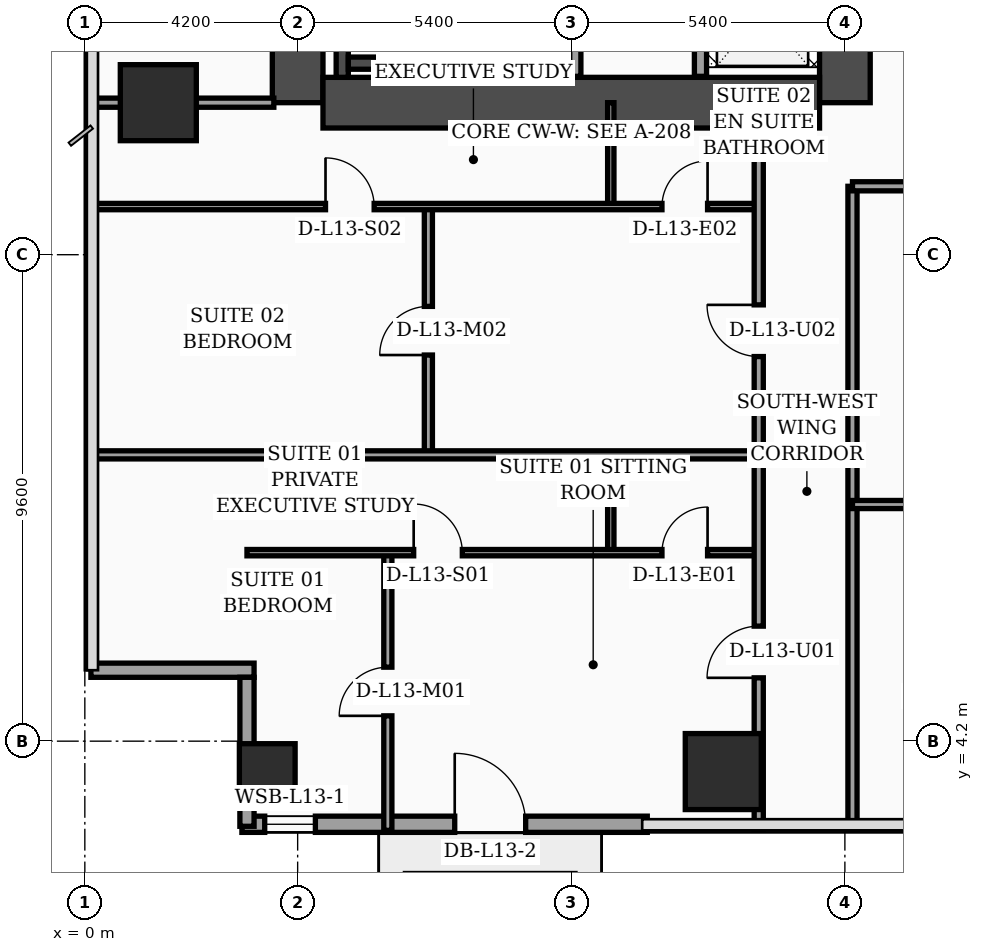
"""IFC4 building model, lengths in metres.
Left out: names, types, materials, properties, quantities, classifications, styles, units other than length and angle.
Written with IfcOpenShell. Run it as: python <this file> out.ifc"""

import sys

from ifc_helpers import new_model, si_unit, direction, frame, frame_2d, origin, origin_2d, place, context, subcontext, project, spatial, rectangle, hollow_rectangle, extrude, element, fill, save


model = new_model("IFC4")
c1 = context("Model", 3, precision=1e-05, world=origin(), true_north=direction((0.0, 1.0)))
c2 = subcontext(c1, "Body", "Model", "MODEL_VIEW")
j1 = project(units=[si_unit("LENGTHUNIT", "METRE"), si_unit("PLANEANGLEUNIT", "RADIAN")], contexts=[c1])
p1 = place(None, origin())
s1 = spatial("IfcSite", under=j1, at=p1, CompositionType="ELEMENT")
p2 = place(p1, origin())
s2 = spatial("IfcBuilding", under=s1, at=p2, CompositionType="ELEMENT")
p3 = place(p2, frame((0.0, 0.0, 58.4)))
s3 = spatial("IfcBuildingStorey", under=s2, at=p3, CompositionType="ELEMENT", Elevation=58.4)
p4 = place(p3, frame((4.2, 16.8, 0.0), z_axis=(0.0, 0.0, 1.0), x_axis=(0.0, 1.0, 0.0)))
e1 = element("IfcWall", 1, at=p4, inside=s3, PredefinedType="SHEAR", context=c2, shape_type="SweptSolid", body=[
    extrude(rectangle(XDim=21.6, YDim=1.0, at=frame_2d((10.8, 0.0))), origin(), (0.0, 0.0, 1.0), 3.56),
])
p5 = place(p3, frame((15.0, 16.8, 0.0), z_axis=(0.0, 0.0, 1.0), x_axis=(0.0, 1.0, 0.0)))
e2 = element("IfcWall", 2, at=p5, inside=s3, PredefinedType="SHEAR", context=c2, shape_type="SweptSolid", body=[
    extrude(rectangle(XDim=21.6, YDim=1.0, at=frame_2d((10.8, 0.0))), origin(), (0.0, 0.0, 1.0), 3.56),
])
p6 = place(p5, frame((8.65, 0.0, 0.0)))
e3 = element("IfcOpeningElement", 3, at=p6, cuts=e2, PredefinedType="OPENING", context=c2, shape_type="SweptSolid", body=[
    extrude(rectangle(XDim=1.1, YDim=2.2, at=frame_2d((0.55, 1.1))), frame((0.0, 0.51, 0.0), z_axis=(0.0, -1.0, 0.0), x_axis=(1.0, 0.0, 0.0)), (0.0, 0.0, 1.0), 1.02),
])
p7 = place(p5, frame((1.25, 0.0, 0.0)))
e4 = element("IfcOpeningElement", 4, at=p7, cuts=e2, PredefinedType="OPENING", context=c2, shape_type="SweptSolid", body=[
    extrude(rectangle(XDim=1.1, YDim=2.2, at=frame_2d((0.55, 1.1))), frame((0.0, 0.51, 0.0), z_axis=(0.0, -1.0, 0.0), x_axis=(1.0, 0.0, 0.0)), (0.0, 0.0, 1.0), 1.02),
])
p8 = place(p5, frame((3.8, 0.0, 0.0)))
e5 = element("IfcOpeningElement", 5, at=p8, cuts=e2, PredefinedType="OPENING", context=c2, shape_type="SweptSolid", body=[
    extrude(rectangle(XDim=1.1, YDim=2.2, at=frame_2d((0.55, 1.1))), frame((0.0, 0.51, 0.0), z_axis=(0.0, -1.0, 0.0), x_axis=(1.0, 0.0, 0.0)), (0.0, 0.0, 1.0), 1.02),
])
p9 = place(p5, frame((6.35, 0.0, 0.0)))
e6 = element("IfcOpeningElement", 6, at=p9, cuts=e2, PredefinedType="OPENING", context=c2, shape_type="SweptSolid", body=[
    extrude(rectangle(XDim=1.1, YDim=2.2, at=frame_2d((0.55, 1.1))), frame((0.0, 0.51, 0.0), z_axis=(0.0, -1.0, 0.0), x_axis=(1.0, 0.0, 0.0)), (0.0, 0.0, 1.0), 1.02),
])
p10 = place(p3, frame((4.7, 16.8, 0.0), z_axis=(0.0, 0.0, 1.0), x_axis=(1.0, 0.0, 0.0)))
e7 = element("IfcWall", 7, at=p10, inside=s3, PredefinedType="SHEAR", context=c2, shape_type="SweptSolid", body=[
    extrude(rectangle(XDim=9.8, YDim=1.0, at=frame_2d((4.9, 0.0))), origin(), (0.0, 0.0, 1.0), 3.56),
])
p11 = place(p3, frame((5.08, 17.3, 0.0), z_axis=(0.0, 0.0, 1.0), x_axis=(0.0, 1.0, 0.0)))
e8 = element("IfcWall", 8, at=p11, inside=s3, PredefinedType="SOLIDWALL", context=c2, shape_type="SweptSolid", body=[
    extrude(rectangle(XDim=9.49, YDim=0.24, at=frame_2d((4.745, 0.0))), origin(), (0.0, 0.0, 1.0), 3.56),
])
p12 = place(p3, frame((8.42, 17.3, 0.0), z_axis=(0.0, 0.0, 1.0), x_axis=(0.0, 1.0, 0.0)))
e9 = element("IfcWall", 9, at=p12, inside=s3, PredefinedType="SOLIDWALL", context=c2, shape_type="SweptSolid", body=[
    extrude(rectangle(XDim=9.49, YDim=0.24, at=frame_2d((4.745, 0.0))), origin(), (0.0, 0.0, 1.0), 3.56),
])
p13 = place(p12, frame((0.35, 0.0, 0.0)))
e10 = element("IfcOpeningElement", 10, at=p13, cuts=e9, PredefinedType="OPENING", context=c2, shape_type="SweptSolid", body=[
    extrude(rectangle(XDim=1.15, YDim=2.2, at=frame_2d((0.575, 1.1))), frame((0.0, 0.13, 0.0), z_axis=(0.0, -1.0, 0.0), x_axis=(1.0, 0.0, 0.0)), (0.0, 0.0, 1.0), 0.26),
])
p14 = place(p3, frame((5.2, 17.58, 0.0), z_axis=(0.0, 0.0, 1.0), x_axis=(1.0, 0.0, 0.0)))
e11 = element("IfcWall", 11, at=p14, inside=s3, PredefinedType="SOLIDWALL", context=c2, shape_type="SweptSolid", body=[
    extrude(rectangle(XDim=3.1, YDim=0.24, at=frame_2d((1.55, 0.0))), origin(), (0.0, 0.0, 1.0), 3.56),
])
p15 = place(p3, frame((3.6, 3.6, 0.0), z_axis=(0.0, 0.0, 1.0), x_axis=(1.0, 0.0, 0.0)))
e12 = element("IfcColumn", 12, at=p15, inside=s3, PredefinedType="COLUMN", context=c2, shape_type="SweptSolid", body=[
    extrude(hollow_rectangle(XDim=1.1, YDim=1.1, WallThickness=0.045, at=origin_2d()), origin(), (0.0, 0.0, 1.0), 3.56),
])
for number, where, z_axis, x_axis in (
    (13, (1.45, 16.8, 0.0), (0.0, 0.0, 1.0), (1.0, 0.0, 0.0)),
    (14, (12.6, 3.6, 0.0), (0.0, 0.0, 1.0), (1.0, 0.0, 0.0)),
):
    element("IfcColumn", number, at=place(p3, frame(where, z_axis=z_axis, x_axis=x_axis)), inside=s3, PredefinedType="COLUMN", context=c2, shape_type="SweptSolid", body=[
        extrude(rectangle(XDim=1.5, YDim=1.5, at=origin_2d()), origin(), (0.0, 0.0, 1.0), 3.56),
    ])
p16 = place(p3, frame((3.1, 2.56, 0.0), z_axis=(0.0, 0.0, 1.0), x_axis=(1.0, 0.0, 0.0)))
e15 = element("IfcWall", 15, at=p16, inside=s3, PredefinedType="SOLIDWALL", context=c2, shape_type="SweptSolid", body=[
    extrude(rectangle(XDim=8.0, YDim=0.32, at=frame_2d((4.0, 0.0))), origin(), (0.0, 0.0, 1.0), 3.56),
])
p17 = place(p16, frame((0.45, 0.0, 0.75)))
e16 = element("IfcOpeningElement", 16, at=p17, cuts=e15, PredefinedType="OPENING", context=c2, shape_type="SweptSolid", body=[
    extrude(rectangle(XDim=1.0, YDim=1.6, at=frame_2d((0.5, 0.8))), frame((0.0, 0.17, 0.0), z_axis=(0.0, -1.0, 0.0), x_axis=(1.0, 0.0, 0.0)), (0.0, 0.0, 1.0), 0.34),
])
p18 = place(p16, frame((4.2, 0.0, 0.0)))
e17 = element("IfcOpeningElement", 17, at=p18, cuts=e15, PredefinedType="OPENING", context=c2, shape_type="SweptSolid", body=[
    extrude(rectangle(XDim=1.4, YDim=2.25, at=frame_2d((0.7, 1.125))), frame((0.0, 0.17, 0.0), z_axis=(0.0, -1.0, 0.0), x_axis=(1.0, 0.0, 0.0)), (0.0, 0.0, 1.0), 0.34),
])
p19 = place(p3, frame((0.12, 5.6, 0.0), z_axis=(0.0, 0.0, 1.0), x_axis=(1.0, 0.0, 0.0)))
e18 = element("IfcWall", 18, at=p19, inside=s3, PredefinedType="SOLIDWALL", context=c2, shape_type="SweptSolid", body=[
    extrude(rectangle(XDim=3.22, YDim=0.28, at=frame_2d((1.61, 0.0))), origin(), (0.0, 0.0, 1.0), 2.84),
])
p20 = place(p3, frame((3.2, 5.46, 0.0), z_axis=(0.0, 0.0, 1.0), x_axis=(0.0, -1.0, 0.0)))
e19 = element("IfcWall", 19, at=p20, inside=s3, PredefinedType="SOLIDWALL", context=c2, shape_type="SweptSolid", body=[
    extrude(rectangle(XDim=2.94, YDim=0.28, at=frame_2d((1.47, 0.0))), origin(), (0.0, 0.0, 1.0), 2.84),
])
p21 = place(p3, frame((9.68, 17.32, 0.0), z_axis=(0.0, 0.0, 1.0), x_axis=(0.0, 1.0, 0.0)))
e20 = element("IfcWall", 20, at=p21, inside=s3, PredefinedType="SOLIDWALL", context=c2, shape_type="SweptSolid", body=[
    extrude(rectangle(XDim=7.68, YDim=0.22, at=frame_2d((3.84, 0.0))), origin(), (0.0, 0.0, 1.0), 3.56),
])
p22 = place(p3, frame((12.15, 17.32, 0.0), z_axis=(0.0, 0.0, 1.0), x_axis=(0.0, 1.0, 0.0)))
e21 = element("IfcWall", 21, at=p22, inside=s3, PredefinedType="SOLIDWALL", context=c2, shape_type="SweptSolid", body=[
    extrude(rectangle(XDim=7.65, YDim=0.24, at=frame_2d((3.825, 0.0))), origin(), (0.0, 0.0, 1.0), 3.56),
])
p23 = place(p3, frame((0.08, 16.8, 0.0), z_axis=(0.0, 0.0, 1.0), x_axis=(1.0, 0.0, 0.0)))
e22 = element("IfcWall", 22, at=p23, inside=s3, PredefinedType="PARTITIONING", context=c2, shape_type="SweptSolid", body=[
    extrude(rectangle(XDim=3.65, YDim=0.18, at=frame_2d((1.825, 0.0))), origin(), (0.0, 0.0, 1.0), 2.84),
])
p24 = place(p3, frame((10.38, 7.92, 0.0), z_axis=(0.0, 0.0, 1.0), x_axis=(0.0, 1.0, 0.0)))
e23 = element("IfcWall", 23, at=p24, inside=s3, PredefinedType="PARTITIONING", context=c2, shape_type="SweptSolid", body=[
    extrude(rectangle(XDim=1.93, YDim=0.125, at=frame_2d((0.965, 0.0))), origin(), (0.0, 0.0, 1.0), 3.09),
])
p25 = place(p3, frame((5.98, 2.44, 0.0), z_axis=(0.0, 0.0, 1.0), x_axis=(0.0, 1.0, 0.0)))
e24 = element("IfcWall", 24, at=p25, inside=s3, PredefinedType="PARTITIONING", context=c2, shape_type="SweptSolid", body=[
    extrude(rectangle(XDim=5.48, YDim=0.16, at=frame_2d((2.74, 0.0))), origin(), (0.0, 0.0, 1.0), 3.04),
])
p26 = place(p25, frame((2.26, 0.0, 0.0)))
e25 = element("IfcOpeningElement", 25, at=p26, cuts=e24, PredefinedType="OPENING", context=c2, shape_type="SweptSolid", body=[
    extrude(rectangle(XDim=0.96, YDim=2.2, at=frame_2d((0.48, 1.1))), frame((0.0, 0.09, 0.0), z_axis=(0.0, -1.0, 0.0), x_axis=(1.0, 0.0, 0.0)), (0.0, 0.0, 1.0), 0.18),
])
p27 = place(p3, frame((3.2, 7.92, 0.0), z_axis=(0.0, 0.0, 1.0), x_axis=(1.0, 0.0, 0.0)))
e26 = element("IfcWall", 26, at=p27, inside=s3, PredefinedType="PARTITIONING", context=c2, shape_type="SweptSolid", body=[
    extrude(rectangle(XDim=10.1, YDim=0.125, at=frame_2d((5.05, 0.0))), origin(), (0.0, 0.0, 1.0), 2.84),
])
p28 = place(p27, frame((3.29, 0.0, 0.0)))
e27 = element("IfcOpeningElement", 27, at=p28, cuts=e26, PredefinedType="OPENING", context=c2, shape_type="SweptSolid", body=[
    extrude(rectangle(XDim=0.96, YDim=2.2, at=frame_2d((0.48, 1.1))), frame((0.0, 0.073, 0.0), z_axis=(0.0, -1.0, 0.0), x_axis=(1.0, 0.0, 0.0)), (0.0, 0.0, 1.0), 0.145),
])
p29 = place(p27, frame((8.19, 0.0, 0.0)))
e28 = element("IfcOpeningElement", 28, at=p29, cuts=e26, PredefinedType="OPENING", context=c2, shape_type="SweptSolid", body=[
    extrude(rectangle(XDim=0.9, YDim=2.15, at=frame_2d((0.45, 1.075))), frame((0.0, 0.073, 0.0), z_axis=(0.0, -1.0, 0.0), x_axis=(1.0, 0.0, 0.0)), (0.0, 0.0, 1.0), 0.145),
])
p30 = place(p3, frame((10.38, 14.75, 0.0), z_axis=(0.0, 0.0, 1.0), x_axis=(0.0, 1.0, 0.0)))
e29 = element("IfcWall", 29, at=p30, inside=s3, PredefinedType="PARTITIONING", context=c2, shape_type="SweptSolid", body=[
    extrude(rectangle(XDim=2.05, YDim=0.125, at=frame_2d((1.025, 0.0))), origin(), (0.0, 0.0, 1.0), 3.56),
])
p31 = place(p3, frame((6.78, 9.85, 0.0), z_axis=(0.0, 0.0, 1.0), x_axis=(0.0, 1.0, 0.0)))
e30 = element("IfcWall", 30, at=p31, inside=s3, PredefinedType="PARTITIONING", context=c2, shape_type="SweptSolid", body=[
    extrude(rectangle(XDim=4.9, YDim=0.16, at=frame_2d((2.45, 0.0))), origin(), (0.0, 0.0, 1.0), 3.14),
])
p32 = place(p31, frame((1.97, 0.0, 0.0)))
e31 = element("IfcOpeningElement", 31, at=p32, cuts=e30, PredefinedType="OPENING", context=c2, shape_type="SweptSolid", body=[
    extrude(rectangle(XDim=0.96, YDim=2.2, at=frame_2d((0.48, 1.1))), frame((0.0, 0.09, 0.0), z_axis=(0.0, -1.0, 0.0), x_axis=(1.0, 0.0, 0.0)), (0.0, 0.0, 1.0), 0.18),
])
p33 = place(p3, frame((0.08, 14.75, 0.0), z_axis=(0.0, 0.0, 1.0), x_axis=(1.0, 0.0, 0.0)))
e32 = element("IfcWall", 32, at=p33, inside=s3, PredefinedType="PARTITIONING", context=c2, shape_type="SweptSolid", body=[
    extrude(rectangle(XDim=13.22, YDim=0.125, at=frame_2d((6.61, 0.0))), origin(), (0.0, 0.0, 1.0), 2.84),
])
p34 = place(p33, frame((4.67, 0.0, 0.0)))
e33 = element("IfcOpeningElement", 33, at=p34, cuts=e32, PredefinedType="OPENING", context=c2, shape_type="SweptSolid", body=[
    extrude(rectangle(XDim=0.96, YDim=2.2, at=frame_2d((0.48, 1.1))), frame((0.0, 0.073, 0.0), z_axis=(0.0, -1.0, 0.0), x_axis=(1.0, 0.0, 0.0)), (0.0, 0.0, 1.0), 0.145),
])
p35 = place(p33, frame((11.31, 0.0, 0.0)))
e34 = element("IfcOpeningElement", 34, at=p35, cuts=e32, PredefinedType="OPENING", context=c2, shape_type="SweptSolid", body=[
    extrude(rectangle(XDim=0.9, YDim=2.15, at=frame_2d((0.45, 1.075))), frame((0.0, 0.073, 0.0), z_axis=(0.0, -1.0, 0.0), x_axis=(1.0, 0.0, 0.0)), (0.0, 0.0, 1.0), 0.145),
])
p36 = place(p3, frame((0.08, 9.85, 0.0), z_axis=(0.0, 0.0, 1.0), x_axis=(1.0, 0.0, 0.0)))
e35 = element("IfcWall", 35, at=p36, inside=s3, PredefinedType="PARTITIONING", context=c2, shape_type="SweptSolid", body=[
    extrude(rectangle(XDim=13.22, YDim=0.16, at=frame_2d((6.61, 0.0))), origin(), (0.0, 0.0, 1.0), 2.84),
])
p37 = place(p3, frame((13.3, 2.44, 0.0), z_axis=(0.0, 0.0, 1.0), x_axis=(0.0, 1.0, 0.0)))
e36 = element("IfcWall", 36, at=p37, inside=s3, PredefinedType="PARTITIONING", context=c2, shape_type="SweptSolid", body=[
    extrude(rectangle(XDim=14.36, YDim=0.18, at=frame_2d((7.18, 0.0))), origin(), (0.0, 0.0, 1.0), 3.04),
])
p38 = place(p37, frame((3.01, 0.0, 0.0)))
e37 = element("IfcOpeningElement", 37, at=p38, cuts=e36, PredefinedType="OPENING", context=c2, shape_type="SweptSolid", body=[
    extrude(rectangle(XDim=1.02, YDim=2.2, at=frame_2d((0.51, 1.1))), frame((0.0, 0.1, 0.0), z_axis=(0.0, -1.0, 0.0), x_axis=(1.0, 0.0, 0.0)), (0.0, 0.0, 1.0), 0.2),
])
p39 = place(p37, frame((9.35, 0.0, 0.0)))
e38 = element("IfcOpeningElement", 38, at=p39, cuts=e36, PredefinedType="OPENING", context=c2, shape_type="SweptSolid", body=[
    extrude(rectangle(XDim=1.02, YDim=2.2, at=frame_2d((0.51, 1.1))), frame((0.0, 0.1, 0.0), z_axis=(0.0, -1.0, 0.0), x_axis=(1.0, 0.0, 0.0)), (0.0, 0.0, 1.0), 0.2),
])
p40 = place(p3, frame((15.15, 2.44, 0.0), z_axis=(0.0, 0.0, 1.0), x_axis=(0.0, 1.0, 0.0)))
e39 = element("IfcWall", 39, at=p40, inside=s3, PredefinedType="PARTITIONING", context=c2, shape_type="SweptSolid", body=[
    extrude(rectangle(XDim=12.71, YDim=0.18, at=frame_2d((6.355, 0.0))), origin(), (0.0, 0.0, 1.0), 3.04),
])
p41 = place(p3, frame((15.15, 8.87, 0.0), z_axis=(0.0, 0.0, 1.0), x_axis=(1.0, 0.0, 0.0)))
e40 = element("IfcWall", 40, at=p41, inside=s3, PredefinedType="PARTITIONING", context=c2, shape_type="SweptSolid", body=[
    extrude(rectangle(XDim=4.45, YDim=0.16, at=frame_2d((2.225, 0.0))), origin(), (0.0, 0.0, 1.0), 3.56),
])
p42 = place(p41, frame((1.75, 0.0, 0.0)))
e41 = element("IfcOpeningElement", 41, at=p42, cuts=e40, PredefinedType="OPENING", context=c2, shape_type="SweptSolid", body=[
    extrude(rectangle(XDim=0.96, YDim=2.2, at=frame_2d((0.48, 1.1))), frame((0.0, 0.09, 0.0), z_axis=(0.0, -1.0, 0.0), x_axis=(1.0, 0.0, 0.0)), (0.0, 0.0, 1.0), 0.18),
])
p43 = place(p3, frame((15.15, 15.15, 0.0), z_axis=(0.0, 0.0, 1.0), x_axis=(1.0, 0.0, 0.0)))
e42 = element("IfcWall", 42, at=p43, inside=s3, PredefinedType="PARTITIONING", context=c2, shape_type="SweptSolid", body=[
    extrude(rectangle(XDim=6.45, YDim=0.18, at=frame_2d((3.225, 0.0))), origin(), (0.0, 0.0, 1.0), 2.34),
])
p44 = place(p43, frame((1.74, 0.0, 0.0)))
e43 = element("IfcOpeningElement", 43, at=p44, cuts=e42, PredefinedType="OPENING", context=c2, shape_type="SweptSolid", body=[
    extrude(rectangle(XDim=1.02, YDim=2.2, at=frame_2d((0.51, 1.1))), frame((0.0, 0.1, 0.0), z_axis=(0.0, -1.0, 0.0), x_axis=(1.0, 0.0, 0.0)), (0.0, 0.0, 1.0), 0.2),
])
p45 = place(p17, origin())
e44 = element("IfcWindow", 44, at=p45, inside=s3, PartitioningType="SINGLE_PANEL", PredefinedType="WINDOW", context=c2, shape_type="SweptSolid", body=[
    extrude(rectangle(XDim=1.0, YDim=1.6, at=frame_2d((0.5, 0.8))), frame((0.0, 0.03, 0.0), z_axis=(0.0, -1.0, 0.0), x_axis=(1.0, 0.0, 0.0)), (0.0, 0.0, 1.0), 0.06),
])
fill(e16, e44)
p46 = place(p18, origin())
e45 = element("IfcDoor", 45, at=p46, inside=s3, OperationType="SINGLE_SWING_LEFT", PredefinedType="DOOR", context=c2, shape_type="SweptSolid", body=[
    extrude(rectangle(XDim=1.4, YDim=2.25, at=frame_2d((0.7, 1.125))), frame((0.0, 0.025, 0.0), z_axis=(0.0, -1.0, 0.0), x_axis=(1.0, 0.0, 0.0)), (0.0, 0.0, 1.0), 0.05),
])
fill(e17, e45)
p47 = place(p26, origin())
e46 = element("IfcDoor", 46, at=p47, inside=s3, OperationType="SINGLE_SWING_LEFT", PredefinedType="DOOR", context=c2, shape_type="SweptSolid", body=[
    extrude(rectangle(XDim=0.96, YDim=2.2, at=frame_2d((0.48, 1.1))), frame((0.0, 0.025, 0.0), z_axis=(0.0, -1.0, 0.0), x_axis=(1.0, 0.0, 0.0)), (0.0, 0.0, 1.0), 0.05),
])
fill(e25, e46)
p48 = place(p28, origin())
e47 = element("IfcDoor", 47, at=p48, inside=s3, OperationType="SINGLE_SWING_LEFT", PredefinedType="DOOR", context=c2, shape_type="SweptSolid", body=[
    extrude(rectangle(XDim=0.96, YDim=2.2, at=frame_2d((0.48, 1.1))), frame((0.0, 0.025, 0.0), z_axis=(0.0, -1.0, 0.0), x_axis=(1.0, 0.0, 0.0)), (0.0, 0.0, 1.0), 0.05),
])
fill(e27, e47)
p49 = place(p29, origin())
e48 = element("IfcDoor", 48, at=p49, inside=s3, OperationType="SINGLE_SWING_RIGHT", PredefinedType="DOOR", context=c2, shape_type="SweptSolid", body=[
    extrude(rectangle(XDim=0.9, YDim=2.15, at=frame_2d((0.45, 1.075))), frame((0.0, 0.025, 0.0), z_axis=(0.0, -1.0, 0.0), x_axis=(1.0, 0.0, 0.0)), (0.0, 0.0, 1.0), 0.05),
])
fill(e28, e48)
p50 = place(p32, origin())
e49 = element("IfcDoor", 49, at=p50, inside=s3, OperationType="SINGLE_SWING_LEFT", PredefinedType="DOOR", context=c2, shape_type="SweptSolid", body=[
    extrude(rectangle(XDim=0.96, YDim=2.2, at=frame_2d((0.48, 1.1))), frame((0.0, 0.025, 0.0), z_axis=(0.0, -1.0, 0.0), x_axis=(1.0, 0.0, 0.0)), (0.0, 0.0, 1.0), 0.05),
])
fill(e31, e49)
p51 = place(p34, origin())
e50 = element("IfcDoor", 50, at=p51, inside=s3, OperationType="SINGLE_SWING_LEFT", PredefinedType="DOOR", context=c2, shape_type="SweptSolid", body=[
    extrude(rectangle(XDim=0.96, YDim=2.2, at=frame_2d((0.48, 1.1))), frame((0.0, 0.025, 0.0), z_axis=(0.0, -1.0, 0.0), x_axis=(1.0, 0.0, 0.0)), (0.0, 0.0, 1.0), 0.05),
])
fill(e33, e50)
p52 = place(p35, origin())
e51 = element("IfcDoor", 51, at=p52, inside=s3, OperationType="SINGLE_SWING_RIGHT", PredefinedType="DOOR", context=c2, shape_type="SweptSolid", body=[
    extrude(rectangle(XDim=0.9, YDim=2.15, at=frame_2d((0.45, 1.075))), frame((0.0, 0.025, 0.0), z_axis=(0.0, -1.0, 0.0), x_axis=(1.0, 0.0, 0.0)), (0.0, 0.0, 1.0), 0.05),
])
fill(e34, e51)
p53 = place(p38, origin())
e52 = element("IfcDoor", 52, at=p53, inside=s3, OperationType="SINGLE_SWING_LEFT", PredefinedType="DOOR", context=c2, shape_type="SweptSolid", body=[
    extrude(rectangle(XDim=1.02, YDim=2.2, at=frame_2d((0.51, 1.1))), frame((0.0, 0.025, 0.0), z_axis=(0.0, -1.0, 0.0), x_axis=(1.0, 0.0, 0.0)), (0.0, 0.0, 1.0), 0.05),
])
fill(e37, e52)
p54 = place(p39, origin())
e53 = element("IfcDoor", 53, at=p54, inside=s3, OperationType="SINGLE_SWING_RIGHT", PredefinedType="DOOR", context=c2, shape_type="SweptSolid", body=[
    extrude(rectangle(XDim=1.02, YDim=2.2, at=frame_2d((0.51, 1.1))), frame((0.0, 0.025, 0.0), z_axis=(0.0, -1.0, 0.0), x_axis=(1.0, 0.0, 0.0)), (0.0, 0.0, 1.0), 0.05),
])
fill(e38, e53)
p55 = place(p13, origin())
e54 = element("IfcDoor", 54, at=p55, inside=s3, OperationType="SINGLE_SWING_LEFT", PredefinedType="DOOR", context=c2, shape_type="SweptSolid", body=[
    extrude(rectangle(XDim=1.15, YDim=2.2, at=frame_2d((0.575, 1.1))), frame((0.0, 0.025, 0.0), z_axis=(0.0, -1.0, 0.0), x_axis=(1.0, 0.0, 0.0)), (0.0, 0.0, 1.0), 0.05),
])
fill(e10, e54)
save(model, sys.argv[1])
